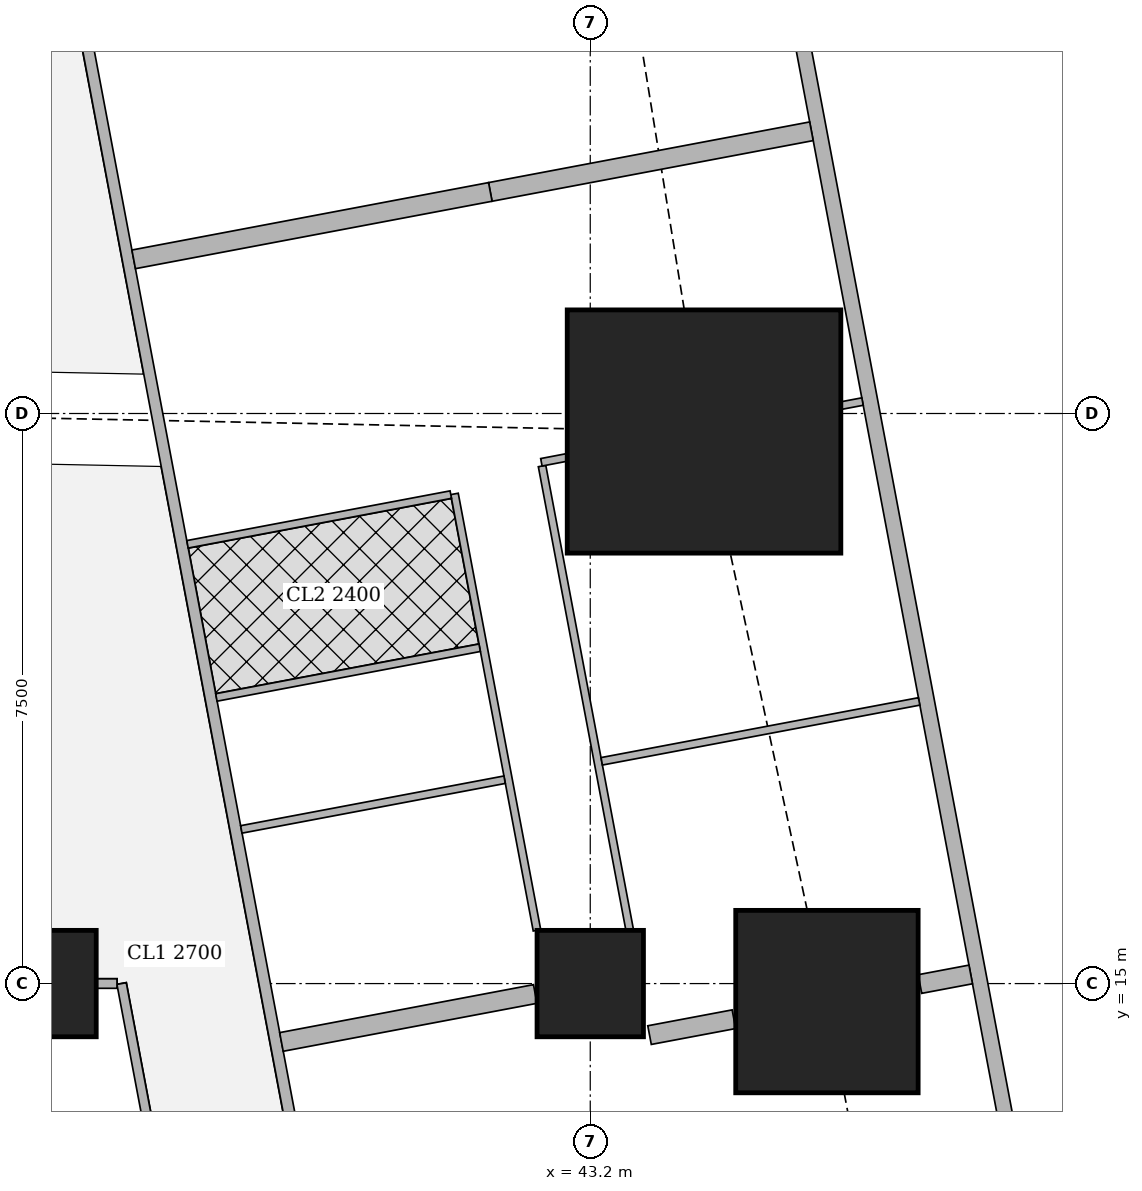
"""IFC4 building model, lengths in metres.
Left out: names, types, materials, properties, quantities, classifications, styles, units other than length and angle.
Written with IfcOpenShell. Run it as: python <this file> out.ifc"""

import sys

from ifc_helpers import new_model, si_unit, direction, frame, frame_2d, origin, origin_2d, place, context, subcontext, project, spatial, rectangle, extrude, element, fill, save


model = new_model("IFC4")
c1 = context("Model", 3, precision=1e-05, world=origin(), true_north=direction((0.0, 1.0)))
c2 = subcontext(c1, "Body", "Model", "MODEL_VIEW")
j1 = project(units=[si_unit("LENGTHUNIT", "METRE"), si_unit("PLANEANGLEUNIT", "RADIAN")], contexts=[c1])
p1 = place(None, origin())
s1 = spatial("IfcSite", under=j1, at=p1, CompositionType="ELEMENT")
p2 = place(p1, origin())
s2 = spatial("IfcBuilding", under=s1, at=p2, CompositionType="ELEMENT")
p3 = place(p2, frame((0.0, 0.0, 223.7)))
s3 = spatial("IfcBuildingStorey", under=s2, at=p3, CompositionType="ELEMENT", Elevation=223.7)
for number, where, z_axis, x_axis in (
    (1, (36.0, 15.0, 0.0), (0.0, 0.0, 1.0), (1.0, 0.0, 0.0)),
    (2, (43.2, 15.0, 0.0), (0.0, 0.0, 1.0), (1.0, 0.0, 0.0)),
):
    element("IfcColumn", number, at=place(p3, frame(where, z_axis=z_axis, x_axis=x_axis)), inside=s3, PredefinedType="COLUMN", context=c2, shape_type="SweptSolid", body=[
        extrude(rectangle(XDim=1.4, YDim=1.4, at=origin_2d()), origin(), (0.0, 0.0, 1.0), 3.75),
    ])
p4 = place(p3, frame((46.314, 14.763, 0.0), z_axis=(0.0, 0.0, 1.0), x_axis=(1.0, 0.0, 0.0)))
e3 = element("IfcColumn", 3, at=p4, inside=s3, PredefinedType="COLUMN", context=c2, shape_type="SweptSolid", body=[
    extrude(rectangle(XDim=2.4, YDim=2.4, at=origin_2d()), origin(), (0.0, 0.0, 1.0), 3.75),
])
p5 = place(p3, frame((44.697, 22.263, 0.0), z_axis=(0.0, 0.0, 1.0), x_axis=(1.0, 0.0, 0.0)))
e4 = element("IfcColumn", 4, at=p5, inside=s3, PredefinedType="COLUMN", context=c2, shape_type="SweptSolid", body=[
    extrude(rectangle(XDim=3.6, YDim=3.2, at=origin_2d()), origin(), (0.0, 0.0, 1.0), 3.75),
])
p6 = place(p3, frame((50.653, 2.703, 0.0), z_axis=(0.0, 0.0, 1.0), x_axis=(-0.185612026696, 0.982623109613, 0.0)))
e5 = element("IfcWall", 5, at=p6, inside=s3, PredefinedType="SOLIDWALL", context=c2, shape_type="SweptSolid", body=[
    extrude(rectangle(XDim=41.393, YDim=0.2, at=frame_2d((20.697, 0.0))), origin(), (0.0, 0.0, 1.0), 3.5),
])
p7 = place(p6, frame((1.633, 0.0, 0.9)))
e6 = element("IfcOpeningElement", 6, at=p7, cuts=e5, PredefinedType="OPENING", context=c2, shape_type="SweptSolid", body=[
    extrude(rectangle(XDim=1.8, YDim=1.5, at=frame_2d((0.9, 0.75))), frame((0.0, 0.11, 0.0), z_axis=(0.0, -1.0, 0.0), x_axis=(1.0, 0.0, 0.0)), (0.0, 0.0, 1.0), 0.22),
])
p8 = place(p6, frame((6.032, 0.0, 0.9)))
e7 = element("IfcOpeningElement", 7, at=p8, cuts=e5, PredefinedType="OPENING", context=c2, shape_type="SweptSolid", body=[
    extrude(rectangle(XDim=1.8, YDim=1.5, at=frame_2d((0.9, 0.75))), frame((0.0, 0.11, 0.0), z_axis=(0.0, -1.0, 0.0), x_axis=(1.0, 0.0, 0.0)), (0.0, 0.0, 1.0), 0.22),
])
p9 = place(p6, frame((9.848, 0.0, 0.9)))
e8 = element("IfcOpeningElement", 8, at=p9, cuts=e5, PredefinedType="OPENING", context=c2, shape_type="SweptSolid", body=[
    extrude(rectangle(XDim=1.8, YDim=1.5, at=frame_2d((0.9, 0.75))), frame((0.0, 0.11, 0.0), z_axis=(0.0, -1.0, 0.0), x_axis=(1.0, 0.0, 0.0)), (0.0, 0.0, 1.0), 0.22),
])
p10 = place(p6, frame((13.664, 0.0, 0.9)))
e9 = element("IfcOpeningElement", 9, at=p10, cuts=e5, PredefinedType="OPENING", context=c2, shape_type="SweptSolid", body=[
    extrude(rectangle(XDim=1.8, YDim=1.5, at=frame_2d((0.9, 0.75))), frame((0.0, 0.11, 0.0), z_axis=(0.0, -1.0, 0.0), x_axis=(1.0, 0.0, 0.0)), (0.0, 0.0, 1.0), 0.22),
])
p11 = place(p6, frame((17.481, 0.0, 0.9)))
e10 = element("IfcOpeningElement", 10, at=p11, cuts=e5, PredefinedType="OPENING", context=c2, shape_type="SweptSolid", body=[
    extrude(rectangle(XDim=1.8, YDim=1.5, at=frame_2d((0.9, 0.75))), frame((0.0, 0.11, 0.0), z_axis=(0.0, -1.0, 0.0), x_axis=(1.0, 0.0, 0.0)), (0.0, 0.0, 1.0), 0.22),
])
p12 = place(p6, frame((21.297, 0.0, 0.9)))
e11 = element("IfcOpeningElement", 11, at=p12, cuts=e5, PredefinedType="OPENING", context=c2, shape_type="SweptSolid", body=[
    extrude(rectangle(XDim=1.8, YDim=1.5, at=frame_2d((0.9, 0.75))), frame((0.0, 0.11, 0.0), z_axis=(0.0, -1.0, 0.0), x_axis=(1.0, 0.0, 0.0)), (0.0, 0.0, 1.0), 0.22),
])
p13 = place(p6, frame((25.113, 0.0, 0.9)))
e12 = element("IfcOpeningElement", 12, at=p13, cuts=e5, PredefinedType="OPENING", context=c2, shape_type="SweptSolid", body=[
    extrude(rectangle(XDim=1.8, YDim=1.5, at=frame_2d((0.9, 0.75))), frame((0.0, 0.11, 0.0), z_axis=(0.0, -1.0, 0.0), x_axis=(1.0, 0.0, 0.0)), (0.0, 0.0, 1.0), 0.22),
])
p14 = place(p6, frame((28.93, 0.0, 0.9)))
e13 = element("IfcOpeningElement", 13, at=p14, cuts=e5, PredefinedType="OPENING", context=c2, shape_type="SweptSolid", body=[
    extrude(rectangle(XDim=1.8, YDim=1.5, at=frame_2d((0.9, 0.75))), frame((0.0, 0.11, 0.0), z_axis=(0.0, -1.0, 0.0), x_axis=(1.0, 0.0, 0.0)), (0.0, 0.0, 1.0), 0.22),
])
p15 = place(p6, frame((32.746, 0.0, 0.9)))
e14 = element("IfcOpeningElement", 14, at=p15, cuts=e5, PredefinedType="OPENING", context=c2, shape_type="SweptSolid", body=[
    extrude(rectangle(XDim=1.8, YDim=1.5, at=frame_2d((0.9, 0.75))), frame((0.0, 0.11, 0.0), z_axis=(0.0, -1.0, 0.0), x_axis=(1.0, 0.0, 0.0)), (0.0, 0.0, 1.0), 0.22),
])
p16 = place(p6, frame((36.481, 0.0, 0.9)))
e15 = element("IfcOpeningElement", 15, at=p16, cuts=e5, PredefinedType="OPENING", context=c2, shape_type="SweptSolid", body=[
    extrude(rectangle(XDim=1.8, YDim=1.5, at=frame_2d((0.9, 0.75))), frame((0.0, 0.11, 0.0), z_axis=(0.0, -1.0, 0.0), x_axis=(1.0, 0.0, 0.0)), (0.0, 0.0, 1.0), 0.22),
])
p17 = place(p3, frame((33.68, 42.723, 0.0), z_axis=(0.0, 0.0, 1.0), x_axis=(0.185601160014, -0.982625162207, 0.0)))
e16 = element("IfcWall", 16, at=p17, inside=s3, PredefinedType="SOLIDWALL", context=c2, shape_type="SweptSolid", body=[
    extrude(rectangle(XDim=41.051, YDim=0.15, at=frame_2d((20.526, 0.0))), origin(), (0.0, 0.0, 1.0), 2.5),
])
p18 = place(p17, frame((16.123, 0.0, 0.0)))
e17 = element("IfcOpeningElement", 17, at=p18, cuts=e16, PredefinedType="OPENING", context=c2, shape_type="SweptSolid", body=[
    extrude(rectangle(XDim=1.0, YDim=2.1, at=frame_2d((0.5, 1.05))), frame((0.0, 0.085, 0.0), z_axis=(0.0, -1.0, 0.0), x_axis=(1.0, 0.0, 0.0)), (0.0, 0.0, 1.0), 0.17),
])
p19 = place(p17, frame((19.938, 0.0, 0.0)))
e18 = element("IfcOpeningElement", 18, at=p19, cuts=e16, PredefinedType="OPENING", context=c2, shape_type="SweptSolid", body=[
    extrude(rectangle(XDim=1.0, YDim=2.1, at=frame_2d((0.5, 1.05))), frame((0.0, 0.085, 0.0), z_axis=(0.0, -1.0, 0.0), x_axis=(1.0, 0.0, 0.0)), (0.0, 0.0, 1.0), 0.17),
])
p20 = place(p17, frame((30.902, 0.0, 0.0)))
e19 = element("IfcOpeningElement", 19, at=p20, cuts=e16, PredefinedType="OPENING", context=c2, shape_type="SweptSolid", body=[
    extrude(rectangle(XDim=1.0, YDim=2.1, at=frame_2d((0.5, 1.05))), frame((0.0, 0.085, 0.0), z_axis=(0.0, -1.0, 0.0), x_axis=(1.0, 0.0, 0.0)), (0.0, 0.0, 1.0), 0.17),
])
p21 = place(p3, frame((42.566, 21.809, 0.0), z_axis=(0.0, 0.0, 1.0), x_axis=(0.185613526435, -0.98262282632, 0.0)))
e20 = element("IfcWall", 20, at=p21, inside=s3, PredefinedType="PARTITIONING", context=c2, shape_type="SweptSolid", body=[
    extrude(rectangle(XDim=6.207, YDim=0.1, at=frame_2d((3.104, 0.0))), origin(), (0.0, 0.0, 1.0), 2.5),
])
p22 = place(p21, frame((1.45, 0.0, 0.0)))
e21 = element("IfcOpeningElement", 21, at=p22, cuts=e20, PredefinedType="OPENING", context=c2, shape_type="SweptSolid", body=[
    extrude(rectangle(XDim=0.9, YDim=2.1, at=frame_2d((0.45, 1.05))), frame((0.0, 0.06, 0.0), z_axis=(0.0, -1.0, 0.0), x_axis=(1.0, 0.0, 0.0)), (0.0, 0.0, 1.0), 0.12),
])
p23 = place(p21, frame((4.163, 0.0, 0.0)))
e22 = element("IfcOpeningElement", 22, at=p23, cuts=e20, PredefinedType="OPENING", context=c2, shape_type="SweptSolid", body=[
    extrude(rectangle(XDim=0.9, YDim=2.1, at=frame_2d((0.45, 1.05))), frame((0.0, 0.06, 0.0), z_axis=(0.0, -1.0, 0.0), x_axis=(1.0, 0.0, 0.0)), (0.0, 0.0, 1.0), 0.12),
])
p24 = place(p3, frame((41.414, 21.442, 0.0), z_axis=(0.0, 0.0, 1.0), x_axis=(0.185698675093, -0.982606738257, 0.0)))
e23 = element("IfcWall", 23, at=p24, inside=s3, PredefinedType="PARTITIONING", context=c2, shape_type="SweptSolid", body=[
    extrude(rectangle(XDim=5.843, YDim=0.1, at=frame_2d((2.921, 0.0))), origin(), (0.0, 0.0, 1.0), 3.5),
])
p25 = place(p24, frame((0.575, 0.0, 0.0)))
e24 = element("IfcOpeningElement", 24, at=p25, cuts=e23, PredefinedType="OPENING", context=c2, shape_type="SweptSolid", body=[
    extrude(rectangle(XDim=0.9, YDim=2.1, at=frame_2d((0.45, 1.05))), frame((0.0, 0.06, 0.0), z_axis=(0.0, -1.0, 0.0), x_axis=(1.0, 0.0, 0.0)), (0.0, 0.0, 1.0), 0.12),
])
p26 = place(p24, frame((2.483, 0.0, 0.0)))
e25 = element("IfcOpeningElement", 25, at=p26, cuts=e23, PredefinedType="OPENING", context=c2, shape_type="SweptSolid", body=[
    extrude(rectangle(XDim=0.9, YDim=2.1, at=frame_2d((0.45, 1.05))), frame((0.0, 0.06, 0.0), z_axis=(0.0, -1.0, 0.0), x_axis=(1.0, 0.0, 0.0)), (0.0, 0.0, 1.0), 0.12),
])
p27 = place(p3, frame((46.782, 22.657, 0.0), z_axis=(0.0, 0.0, 1.0), x_axis=(-0.982574553168, -0.185868898601, 0.0)))
e26 = element("IfcWall", 26, at=p27, inside=s3, PredefinedType="PARTITIONING", context=c2, shape_type="SweptSolid", body=[
    extrude(rectangle(XDim=0.28, YDim=0.1, at=frame_2d((0.14, 0.0))), origin(), (0.0, 0.0, 1.0), 3.5),
])
p28 = place(p3, frame((42.887, 21.921, 0.0), z_axis=(0.0, 0.0, 1.0), x_axis=(-0.982274918032, -0.187445953293, 0.0)))
e27 = element("IfcWall", 27, at=p28, inside=s3, PredefinedType="PARTITIONING", context=c2, shape_type="SweptSolid", body=[
    extrude(rectangle(XDim=0.336, YDim=0.1, at=frame_2d((0.168, 0.0))), origin(), (0.0, 0.0, 1.0), 2.5),
])
p29 = place(p3, frame((47.527, 18.712, 0.0), z_axis=(0.0, 0.0, 1.0), x_axis=(-0.982665405803, -0.185387972203, 0.0)))
e28 = element("IfcWall", 28, at=p29, inside=s3, PredefinedType="PARTITIONING", context=c2, shape_type="SweptSolid", body=[
    extrude(rectangle(XDim=4.25, YDim=0.1, at=frame_2d((2.125, 0.0))), origin(), (0.0, 0.0, 1.0), 2.05),
])
p30 = place(p3, frame((41.365, 21.433, 0.0), z_axis=(0.0, 0.0, 1.0), x_axis=(-0.982638553676, -0.185530247748, 0.0)))
e29 = element("IfcWall", 29, at=p30, inside=s3, PredefinedType="PARTITIONING", context=c2, shape_type="SweptSolid", body=[
    extrude(rectangle(XDim=3.525, YDim=0.1, at=frame_2d((1.763, 0.0))), origin(), (0.0, 0.0, 1.0), 3.5),
])
p31 = place(p3, frame((42.073, 17.682, 0.0), z_axis=(0.0, 0.0, 1.0), x_axis=(-0.98265117712, -0.185463376723, 0.0)))
e30 = element("IfcWall", 30, at=p31, inside=s3, PredefinedType="PARTITIONING", context=c2, shape_type="SweptSolid", body=[
    extrude(rectangle(XDim=3.525, YDim=0.1, at=frame_2d((1.763, 0.0))), origin(), (0.0, 0.0, 1.0), 3.5),
])
p32 = place(p31, frame((1.325, 0.0, 0.0)))
e31 = element("IfcOpeningElement", 31, at=p32, cuts=e30, PredefinedType="OPENING", context=c2, shape_type="SweptSolid", body=[
    extrude(rectangle(XDim=0.9, YDim=2.1, at=frame_2d((0.45, 1.05))), frame((0.0, 0.06, 0.0), z_axis=(0.0, -1.0, 0.0), x_axis=(1.0, 0.0, 0.0)), (0.0, 0.0, 1.0), 0.12),
])
p33 = place(p3, frame((41.745, 19.418, 0.0), z_axis=(0.0, 0.0, 1.0), x_axis=(-0.982638553676, -0.185530247748, 0.0)))
e32 = element("IfcWall", 32, at=p33, inside=s3, PredefinedType="PARTITIONING", context=c2, shape_type="SweptSolid", body=[
    extrude(rectangle(XDim=3.525, YDim=0.1, at=frame_2d((1.763, 0.0))), origin(), (0.0, 0.0, 1.0), 3.5),
])
p34 = place(p3, frame((46.11, 26.213, 0.0), z_axis=(0.0, 0.0, 1.0), x_axis=(-0.982633535512, -0.185556823879, 0.0)))
e33 = element("IfcWall", 33, at=p34, inside=s3, PredefinedType="SOLIDWALL", context=c2, shape_type="SweptSolid", body=[
    extrude(rectangle(XDim=4.3, YDim=0.25, at=frame_2d((2.15, 0.0))), origin(), (0.0, 0.0, 1.0), 2.05),
])
p35 = place(p3, frame((41.885, 25.415, 0.0), z_axis=(0.0, 0.0, 1.0), x_axis=(-0.982596737686, -0.185751584349, 0.0)))
e34 = element("IfcWall", 34, at=p35, inside=s3, PredefinedType="SOLIDWALL", context=c2, shape_type="SweptSolid", body=[
    extrude(rectangle(XDim=4.775, YDim=0.25, at=frame_2d((2.387, 0.0))), origin(), (0.0, 0.0, 1.0), 3.5),
])
p36 = place(p3, frame((48.206, 15.12, 0.0), z_axis=(0.0, 0.0, 1.0), x_axis=(-0.982610999048, -0.18567612811, 0.0)))
e35 = element("IfcWall", 35, at=p36, inside=s3, PredefinedType="SOLIDWALL", context=c2, shape_type="SweptSolid", body=[
    extrude(rectangle(XDim=0.68, YDim=0.25, at=frame_2d((0.34, 0.0))), origin(), (0.0, 0.0, 1.0), 2.05),
])
p37 = place(p3, frame((45.09, 14.531, 0.0), z_axis=(0.0, 0.0, 1.0), x_axis=(-0.982737354171, -0.185006196431, 0.0)))
e36 = element("IfcWall", 36, at=p37, inside=s3, PredefinedType="SOLIDWALL", context=c2, shape_type="SweptSolid", body=[
    extrude(rectangle(XDim=1.13, YDim=0.25, at=frame_2d((0.565, 0.0))), origin(), (0.0, 0.0, 1.0), 2.05),
])
p38 = place(p3, frame((42.476, 14.863, 0.0), z_axis=(0.0, 0.0, 1.0), x_axis=(-0.982603567712, -0.185715450942, 0.0)))
e37 = element("IfcWall", 37, at=p38, inside=s3, PredefinedType="SOLIDWALL", context=c2, shape_type="SweptSolid", body=[
    extrude(rectangle(XDim=3.398, YDim=0.25, at=frame_2d((1.699, 0.0))), origin(), (0.0, 0.0, 1.0), 3.5),
])
p39 = place(p3, frame((37.9, 10.413, 0.0), z_axis=(0.0, 0.0, 1.0), x_axis=(-0.185513629891, 0.982641691119, 0.0)))
e38 = element("IfcWall", 38, at=p39, inside=s3, PredefinedType="PARTITIONING", context=c2, shape_type="SweptSolid", body=[
    extrude(rectangle(XDim=4.668, YDim=0.125, at=frame_2d((2.334, 0.0))), origin(), (0.0, 0.0, 1.0), 3.5),
])
p40 = place(p39, frame((0.708, 0.0, 0.0)))
e39 = element("IfcOpeningElement", 39, at=p40, cuts=e38, PredefinedType="OPENING", context=c2, shape_type="SweptSolid", body=[
    extrude(rectangle(XDim=1.0, YDim=2.1, at=frame_2d((0.5, 1.05))), frame((0.0, 0.073, 0.0), z_axis=(0.0, -1.0, 0.0), x_axis=(1.0, 0.0, 0.0)), (0.0, 0.0, 1.0), 0.145),
])
p41 = place(p3, frame((36.701, 15.0, 0.0), z_axis=(0.0, 0.0, 1.0), x_axis=(1.0, 0.0, 0.0)))
e40 = element("IfcWall", 40, at=p41, inside=s3, PredefinedType="PARTITIONING", context=c2, shape_type="SweptSolid", body=[
    extrude(rectangle(XDim=0.272, YDim=0.125, at=frame_2d((0.136, 0.0))), origin(), (0.0, 0.0, 1.0), 3.5),
])
p42 = place(p9, origin())
e41 = element("IfcWindow", 41, at=p42, inside=s3, PartitioningType="SINGLE_PANEL", PredefinedType="WINDOW", context=c2, shape_type="SweptSolid", body=[
    extrude(rectangle(XDim=1.8, YDim=1.5, at=frame_2d((0.9, 0.75))), frame((0.0, 0.03, 0.0), z_axis=(0.0, -1.0, 0.0), x_axis=(1.0, 0.0, 0.0)), (0.0, 0.0, 1.0), 0.06),
])
fill(e8, e41)
p43 = place(p10, origin())
e42 = element("IfcWindow", 42, at=p43, inside=s3, PartitioningType="SINGLE_PANEL", PredefinedType="WINDOW", context=c2, shape_type="SweptSolid", body=[
    extrude(rectangle(XDim=1.8, YDim=1.5, at=frame_2d((0.9, 0.75))), frame((0.0, 0.03, 0.0), z_axis=(0.0, -1.0, 0.0), x_axis=(1.0, 0.0, 0.0)), (0.0, 0.0, 1.0), 0.06),
])
fill(e9, e42)
p44 = place(p11, origin())
e43 = element("IfcWindow", 43, at=p44, inside=s3, PartitioningType="SINGLE_PANEL", PredefinedType="WINDOW", context=c2, shape_type="SweptSolid", body=[
    extrude(rectangle(XDim=1.8, YDim=1.5, at=frame_2d((0.9, 0.75))), frame((0.0, 0.03, 0.0), z_axis=(0.0, -1.0, 0.0), x_axis=(1.0, 0.0, 0.0)), (0.0, 0.0, 1.0), 0.06),
])
fill(e10, e43)
p45 = place(p12, origin())
e44 = element("IfcWindow", 44, at=p45, inside=s3, PartitioningType="SINGLE_PANEL", PredefinedType="WINDOW", context=c2, shape_type="SweptSolid", body=[
    extrude(rectangle(XDim=1.8, YDim=1.5, at=frame_2d((0.9, 0.75))), frame((0.0, 0.03, 0.0), z_axis=(0.0, -1.0, 0.0), x_axis=(1.0, 0.0, 0.0)), (0.0, 0.0, 1.0), 0.06),
])
fill(e11, e44)
p46 = place(p18, origin())
e45 = element("IfcDoor", 45, at=p46, inside=s3, OperationType="SINGLE_SWING_LEFT", PredefinedType="DOOR", context=c2, shape_type="SweptSolid", body=[
    extrude(rectangle(XDim=1.0, YDim=2.1, at=frame_2d((0.5, 1.05))), frame((0.0, 0.025, 0.0), z_axis=(0.0, -1.0, 0.0), x_axis=(1.0, 0.0, 0.0)), (0.0, 0.0, 1.0), 0.05),
])
fill(e17, e45)
p47 = place(p22, origin())
e46 = element("IfcDoor", 46, at=p47, inside=s3, OperationType="SINGLE_SWING_LEFT", PredefinedType="DOOR", context=c2, shape_type="SweptSolid", body=[
    extrude(rectangle(XDim=0.9, YDim=2.1, at=frame_2d((0.45, 1.05))), frame((0.0, 0.025, 0.0), z_axis=(0.0, -1.0, 0.0), x_axis=(1.0, 0.0, 0.0)), (0.0, 0.0, 1.0), 0.05),
])
fill(e21, e46)
p48 = place(p23, origin())
e47 = element("IfcDoor", 47, at=p48, inside=s3, OperationType="SINGLE_SWING_LEFT", PredefinedType="DOOR", context=c2, shape_type="SweptSolid", body=[
    extrude(rectangle(XDim=0.9, YDim=2.1, at=frame_2d((0.45, 1.05))), frame((0.0, 0.025, 0.0), z_axis=(0.0, -1.0, 0.0), x_axis=(1.0, 0.0, 0.0)), (0.0, 0.0, 1.0), 0.05),
])
fill(e22, e47)
p49 = place(p25, origin())
e48 = element("IfcDoor", 48, at=p49, inside=s3, OperationType="SINGLE_SWING_RIGHT", PredefinedType="DOOR", context=c2, shape_type="SweptSolid", body=[
    extrude(rectangle(XDim=0.9, YDim=2.1, at=frame_2d((0.45, 1.05))), frame((0.0, 0.025, 0.0), z_axis=(0.0, -1.0, 0.0), x_axis=(1.0, 0.0, 0.0)), (0.0, 0.0, 1.0), 0.05),
])
fill(e24, e48)
p50 = place(p26, origin())
e49 = element("IfcDoor", 49, at=p50, inside=s3, OperationType="SINGLE_SWING_RIGHT", PredefinedType="DOOR", context=c2, shape_type="SweptSolid", body=[
    extrude(rectangle(XDim=0.9, YDim=2.1, at=frame_2d((0.45, 1.05))), frame((0.0, 0.025, 0.0), z_axis=(0.0, -1.0, 0.0), x_axis=(1.0, 0.0, 0.0)), (0.0, 0.0, 1.0), 0.05),
])
fill(e25, e49)
p51 = place(p19, origin())
e50 = element("IfcDoor", 50, at=p51, inside=s3, OperationType="SINGLE_SWING_RIGHT", PredefinedType="DOOR", context=c2, shape_type="SweptSolid", body=[
    extrude(rectangle(XDim=1.0, YDim=2.1, at=frame_2d((0.5, 1.05))), frame((0.0, 0.025, 0.0), z_axis=(0.0, -1.0, 0.0), x_axis=(1.0, 0.0, 0.0)), (0.0, 0.0, 1.0), 0.05),
])
fill(e18, e50)
p52 = place(p32, origin())
e51 = element("IfcDoor", 51, at=p52, inside=s3, OperationType="SINGLE_SWING_RIGHT", PredefinedType="DOOR", context=c2, shape_type="SweptSolid", body=[
    extrude(rectangle(XDim=0.9, YDim=2.1, at=frame_2d((0.45, 1.05))), frame((0.0, 0.025, 0.0), z_axis=(0.0, -1.0, 0.0), x_axis=(1.0, 0.0, 0.0)), (0.0, 0.0, 1.0), 0.05),
])
fill(e31, e51)
save(model, sys.argv[1])
